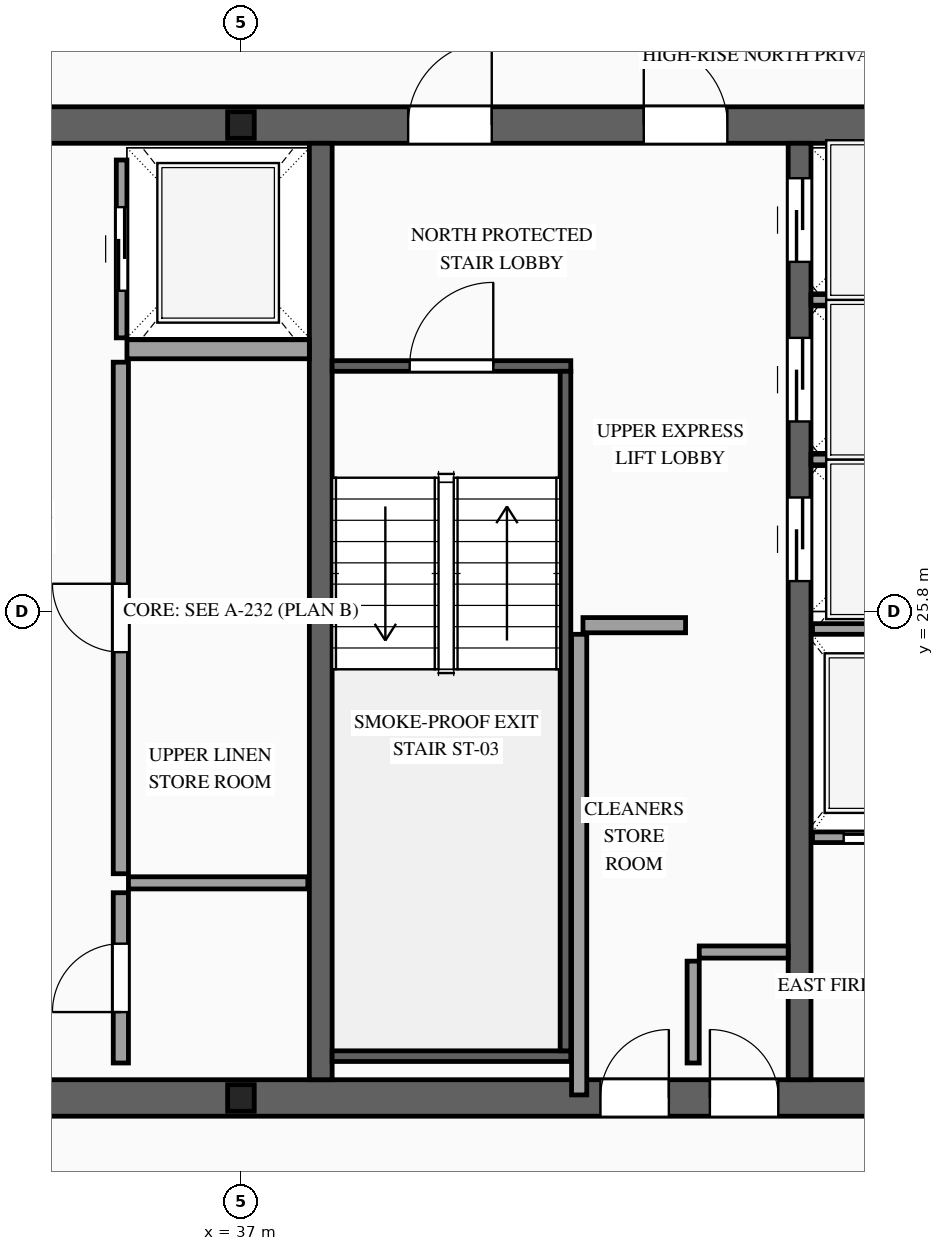
"""IFC4 building model, lengths in metres.
Left out: names, types, materials, properties, quantities, classifications, styles, units other than length and angle.
Written with IfcOpenShell. Run it as: python <this file> out.ifc"""

import sys

from ifc_helpers import new_model, si_unit, direction, frame, frame_2d, origin, origin_2d, place, context, subcontext, project, spatial, rectangle, i_section, extrude, source, transform, mapped, element, fill, save


model = new_model("IFC4")
c1 = context("Model", 3, precision=1e-05, world=origin(), true_north=direction((0.0, 1.0)))
c2 = subcontext(c1, "Body", "Model", "MODEL_VIEW")
j1 = project(units=[si_unit("LENGTHUNIT", "METRE"), si_unit("PLANEANGLEUNIT", "RADIAN")], contexts=[c1])
p1 = place(None, origin())
s1 = spatial("IfcSite", under=j1, at=p1, CompositionType="ELEMENT")
p2 = place(p1, origin())
s2 = spatial("IfcBuilding", under=s1, at=p2, CompositionType="ELEMENT")
p3 = place(p2, frame((0.0, 0.0, 299.6)))
s3 = spatial("IfcBuildingStorey", under=s2, at=p3, CompositionType="ELEMENT", Elevation=299.6)
p4 = place(p3, frame((23.56, 19.4, 0.0), z_axis=(0.0, 0.0, 1.0), x_axis=(1.0, 0.0, 0.0)))
e1 = element("IfcWall", 1, at=p4, inside=s3, PredefinedType="SHEAR", context=c2, shape_type="SweptSolid", body=[
    extrude(rectangle(XDim=26.88, YDim=0.48, at=frame_2d((13.44, 0.0))), origin(), (0.0, 0.0, 1.0), 3.5),
])
p5 = place(p4, frame((1.89, 0.0, 0.0)))
e2 = element("IfcOpeningElement", 2, at=p5, cuts=e1, PredefinedType="OPENING", context=c2, shape_type="SweptSolid", body=[
    extrude(rectangle(XDim=1.1, YDim=2.2, at=frame_2d((0.55, 1.1))), frame((0.0, 0.255, 0.0), z_axis=(0.0, -1.0, 0.0), x_axis=(1.0, 0.0, 0.0)), (0.0, 0.0, 1.0), 0.51),
])
p6 = place(p4, frame((9.79, 0.0, 0.0)))
e3 = element("IfcOpeningElement", 3, at=p6, cuts=e1, PredefinedType="OPENING", context=c2, shape_type="SweptSolid", body=[
    extrude(rectangle(XDim=1.1, YDim=2.2, at=frame_2d((0.55, 1.1))), frame((0.0, 0.255, 0.0), z_axis=(0.0, -1.0, 0.0), x_axis=(1.0, 0.0, 0.0)), (0.0, 0.0, 1.0), 0.51),
])
p7 = place(p4, frame((22.99, 0.0, 0.0)))
e4 = element("IfcOpeningElement", 4, at=p7, cuts=e1, PredefinedType="OPENING", context=c2, shape_type="SweptSolid", body=[
    extrude(rectangle(XDim=1.1, YDim=2.2, at=frame_2d((0.55, 1.1))), frame((0.0, 0.255, 0.0), z_axis=(0.0, -1.0, 0.0), x_axis=(1.0, 0.0, 0.0)), (0.0, 0.0, 1.0), 0.51),
])
p8 = place(p4, frame((19.61, 0.0, 0.0)))
e5 = element("IfcOpeningElement", 5, at=p8, cuts=e1, PredefinedType="OPENING", context=c2, shape_type="SweptSolid", body=[
    extrude(rectangle(XDim=0.9, YDim=2.15, at=frame_2d((0.45, 1.075))), frame((0.0, 0.255, 0.0), z_axis=(0.0, -1.0, 0.0), x_axis=(1.0, 0.0, 0.0)), (0.0, 0.0, 1.0), 0.51),
])
p9 = place(p4, frame((18.17, 0.0, 0.0)))
e6 = element("IfcOpeningElement", 6, at=p9, cuts=e1, PredefinedType="OPENING", context=c2, shape_type="SweptSolid", body=[
    extrude(rectangle(XDim=0.9, YDim=2.15, at=frame_2d((0.45, 1.075))), frame((0.0, 0.255, 0.0), z_axis=(0.0, -1.0, 0.0), x_axis=(1.0, 0.0, 0.0)), (0.0, 0.0, 1.0), 0.51),
])
p10 = place(p3, frame((23.56, 32.2, 0.0), z_axis=(0.0, 0.0, 1.0), x_axis=(1.0, 0.0, 0.0)))
e7 = element("IfcWall", 7, at=p10, inside=s3, PredefinedType="SHEAR", context=c2, shape_type="SweptSolid", body=[
    extrude(rectangle(XDim=26.88, YDim=0.48, at=frame_2d((13.44, 0.0))), origin(), (0.0, 0.0, 1.0), 3.5),
])
p11 = place(p10, frame((4.51, 0.0, 0.0)))
e8 = element("IfcOpeningElement", 8, at=p11, cuts=e7, PredefinedType="OPENING", context=c2, shape_type="SweptSolid", body=[
    extrude(rectangle(XDim=0.9, YDim=2.15, at=frame_2d((0.45, 1.075))), frame((0.0, 0.255, 0.0), z_axis=(0.0, -1.0, 0.0), x_axis=(1.0, 0.0, 0.0)), (0.0, 0.0, 1.0), 0.51),
])
p12 = place(p10, frame((9.79, 0.0, 0.0)))
e9 = element("IfcOpeningElement", 9, at=p12, cuts=e7, PredefinedType="OPENING", context=c2, shape_type="SweptSolid", body=[
    extrude(rectangle(XDim=1.1, YDim=2.2, at=frame_2d((0.55, 1.1))), frame((0.0, 0.255, 0.0), z_axis=(0.0, -1.0, 0.0), x_axis=(1.0, 0.0, 0.0)), (0.0, 0.0, 1.0), 0.51),
])
p13 = place(p10, frame((15.64, 0.0, 0.0)))
e10 = element("IfcOpeningElement", 10, at=p13, cuts=e7, PredefinedType="OPENING", context=c2, shape_type="SweptSolid", body=[
    extrude(rectangle(XDim=1.1, YDim=2.2, at=frame_2d((0.55, 1.1))), frame((0.0, 0.255, 0.0), z_axis=(0.0, -1.0, 0.0), x_axis=(1.0, 0.0, 0.0)), (0.0, 0.0, 1.0), 0.51),
])
p14 = place(p10, frame((18.74, 0.0, 0.0)))
e11 = element("IfcOpeningElement", 11, at=p14, cuts=e7, PredefinedType="OPENING", context=c2, shape_type="SweptSolid", body=[
    extrude(rectangle(XDim=1.1, YDim=2.2, at=frame_2d((0.55, 1.1))), frame((0.0, 0.255, 0.0), z_axis=(0.0, -1.0, 0.0), x_axis=(1.0, 0.0, 0.0)), (0.0, 0.0, 1.0), 0.51),
])
m1 = source(origin(), c2, "Body", "SweptSolid", [
    extrude(rectangle(XDim=12.32, YDim=0.3, at=frame_2d((6.16, 0.0))), origin(), (0.0, 0.0, 1.0), 3.5),
])
p15 = place(p3, frame((38.05, 19.64, 0.0), z_axis=(0.0, 0.0, 1.0), x_axis=(0.0, 1.0, 0.0)))
e12 = element("IfcWall", 12, at=p15, inside=s3, PredefinedType="SOLIDWALL", context=c2, shape_type="MappedRepresentation", body=[
    mapped(m1, transform((0.0, 0.0, 0.0), scale=1.0)),
])
p16 = place(p3, frame((44.35, 19.64, 0.0), z_axis=(0.0, 0.0, 1.0), x_axis=(0.0, 1.0, 0.0)))
e13 = element("IfcWall", 13, at=p16, inside=s3, PredefinedType="SOLIDWALL", context=c2, shape_type="SweptSolid", body=[
    extrude(rectangle(XDim=12.32, YDim=0.3, at=frame_2d((6.16, 0.0))), origin(), (0.0, 0.0, 1.0), 3.5),
])
p17 = place(p16, frame((6.56, 0.0, 0.0)))
e14 = element("IfcOpeningElement", 14, at=p17, cuts=e13, PredefinedType="OPENING", context=c2, shape_type="SweptSolid", body=[
    extrude(rectangle(XDim=1.1, YDim=2.2, at=frame_2d((0.55, 1.1))), frame((0.0, 0.165, 0.0), z_axis=(0.0, -1.0, 0.0), x_axis=(1.0, 0.0, 0.0)), (0.0, 0.0, 1.0), 0.33),
])
p18 = place(p16, frame((8.66, 0.0, 0.0)))
e15 = element("IfcOpeningElement", 15, at=p18, cuts=e13, PredefinedType="OPENING", context=c2, shape_type="SweptSolid", body=[
    extrude(rectangle(XDim=1.1, YDim=2.2, at=frame_2d((0.55, 1.1))), frame((0.0, 0.165, 0.0), z_axis=(0.0, -1.0, 0.0), x_axis=(1.0, 0.0, 0.0)), (0.0, 0.0, 1.0), 0.33),
])
p19 = place(p16, frame((10.76, 0.0, 0.0)))
e16 = element("IfcOpeningElement", 16, at=p19, cuts=e13, PredefinedType="OPENING", context=c2, shape_type="SweptSolid", body=[
    extrude(rectangle(XDim=1.1, YDim=2.2, at=frame_2d((0.55, 1.1))), frame((0.0, 0.165, 0.0), z_axis=(0.0, -1.0, 0.0), x_axis=(1.0, 0.0, 0.0)), (0.0, 0.0, 1.0), 0.33),
])
m2 = source(origin(), c2, "Body", "SweptSolid", [
    extrude(i_section(OverallWidth=0.35, OverallDepth=0.35, WebThickness=0.012, FlangeThickness=0.019, at=origin_2d()), origin(), (0.0, 0.0, 1.0), 3.5),
])
for number, where, z_axis, x_axis in (
    (17, (37.0, 19.4, 0.0), (0.0, 0.0, 1.0), (1.0, 0.0, 0.0)),
    (18, (37.0, 32.2, 0.0), (0.0, 0.0, 1.0), (1.0, 0.0, 0.0)),
):
    element("IfcColumn", number, at=place(p3, frame(where, z_axis=z_axis, x_axis=x_axis)), inside=s3, PredefinedType="COLUMN", context=c2, shape_type="MappedRepresentation", body=[
        mapped(m2, transform((0.0, 0.0, 0.0), scale=1.0)),
    ])
p20 = place(p3, frame((44.52, 22.83, 0.0), z_axis=(0.0, 0.0, 1.0), x_axis=(1.0, 0.0, 0.0)))
e19 = element("IfcWall", 19, at=p20, inside=s3, PredefinedType="SOLIDWALL", context=c2, shape_type="SweptSolid", body=[
    extrude(rectangle(XDim=1.92, YDim=0.14, at=frame_2d((0.96, 0.0))), origin(), (0.0, 0.0, 1.0), 3.28),
])
p21 = place(p20, frame((0.41, 0.0, 0.0)))
e20 = element("IfcOpeningElement", 20, at=p21, cuts=e19, PredefinedType="OPENING", context=c2, shape_type="SweptSolid", body=[
    extrude(rectangle(XDim=1.1, YDim=2.2, at=frame_2d((0.55, 1.1))), frame((0.0, 0.085, 0.0), z_axis=(0.0, -1.0, 0.0), x_axis=(1.0, 0.0, 0.0)), (0.0, 0.0, 1.0), 0.17),
])
m3 = source(origin(), c2, "Body", "SweptSolid", [
    extrude(rectangle(XDim=1.92, YDim=0.14, at=frame_2d((0.96, 0.0))), origin(), (0.0, 0.0, 1.0), 3.28),
])
p22 = place(p3, frame((44.52, 25.57, 0.0), z_axis=(0.0, 0.0, 1.0), x_axis=(1.0, 0.0, 0.0)))
e21 = element("IfcWall", 21, at=p22, inside=s3, PredefinedType="SOLIDWALL", context=c2, shape_type="MappedRepresentation", body=[
    mapped(m3, transform((0.0, 0.0, 0.0), scale=1.0)),
])
p23 = place(p3, frame((35.43, 29.4, 0.0), z_axis=(0.0, 0.0, 1.0), x_axis=(0.0, 1.0, 0.0)))
e22 = element("IfcWall", 22, at=p23, inside=s3, PredefinedType="SOLIDWALL", context=c2, shape_type="SweptSolid", body=[
    extrude(rectangle(XDim=2.34, YDim=0.14, at=frame_2d((1.17, 0.0))), origin(), (0.0, 0.0, 1.0), 3.28),
])
p24 = place(p23, frame((0.62, 0.0, 0.0)))
e23 = element("IfcOpeningElement", 23, at=p24, cuts=e22, PredefinedType="OPENING", context=c2, shape_type="SweptSolid", body=[
    extrude(rectangle(XDim=1.1, YDim=2.2, at=frame_2d((0.55, 1.1))), frame((0.0, 0.085, 0.0), z_axis=(0.0, -1.0, 0.0), x_axis=(1.0, 0.0, 0.0)), (0.0, 0.0, 1.0), 0.17),
])
m4 = source(origin(), c2, "Body", "SweptSolid", [
    extrude(rectangle(XDim=2.4, YDim=0.25, at=frame_2d((1.2, 0.0))), origin(), (0.0, 0.0, 1.0), 3.28),
])
p25 = place(p3, frame((35.5, 29.25, 0.0), z_axis=(0.0, 0.0, 1.0), x_axis=(1.0, 0.0, 0.0)))
e24 = element("IfcWall", 24, at=p25, inside=s3, PredefinedType="SOLIDWALL", context=c2, shape_type="MappedRepresentation", body=[
    mapped(m4, transform((0.0, 0.0, 0.0), scale=1.0)),
])
m5 = source(origin(), c2, "Body", "SweptSolid", [
    extrude(rectangle(XDim=2.0, YDim=0.14, at=frame_2d((1.0, 0.0))), origin(), (0.0, 0.0, 1.0), 3.28),
])
for number, where, z_axis, x_axis in (
    (25, (44.5, 27.8, 0.0), (0.0, 0.0, 1.0), (1.0, 0.0, 0.0)),
    (26, (44.5, 29.9, 0.0), (0.0, 0.0, 1.0), (1.0, 0.0, 0.0)),
):
    element("IfcWall", number, at=place(p3, frame(where, z_axis=z_axis, x_axis=x_axis)), inside=s3, PredefinedType="SOLIDWALL", context=c2, shape_type="MappedRepresentation", body=[
        mapped(m5, transform((0.0, 0.0, 0.0), scale=1.0)),
    ])
p26 = place(p3, frame((38.2, 29.03, 0.0), z_axis=(0.0, 0.0, 1.0), x_axis=(1.0, 0.0, 0.0)))
e27 = element("IfcWall", 27, at=p26, inside=s3, PredefinedType="SOLIDWALL", context=c2, shape_type="SweptSolid", body=[
    extrude(rectangle(XDim=3.14, YDim=0.14, at=frame_2d((1.57, 0.0))), origin(), (0.0, 0.0, 1.0), 3.28),
])
p27 = place(p26, frame((1.02, 0.0, 0.0)))
e28 = element("IfcOpeningElement", 28, at=p27, cuts=e27, PredefinedType="OPENING", context=c2, shape_type="SweptSolid", body=[
    extrude(rectangle(XDim=1.1, YDim=2.2, at=frame_2d((0.55, 1.1))), frame((0.0, 0.085, 0.0), z_axis=(0.0, -1.0, 0.0), x_axis=(1.0, 0.0, 0.0)), (0.0, 0.0, 1.0), 0.17),
])
m6 = source(origin(), c2, "Body", "SweptSolid", [
    extrude(rectangle(XDim=3.14, YDim=0.14, at=frame_2d((1.57, 0.0))), origin(), (0.0, 0.0, 1.0), 3.28),
])
p28 = place(p3, frame((38.2, 19.95, 0.0), z_axis=(0.0, 0.0, 1.0), x_axis=(1.0, 0.0, 0.0)))
e29 = element("IfcWall", 29, at=p28, inside=s3, PredefinedType="SOLIDWALL", context=c2, shape_type="MappedRepresentation", body=[
    mapped(m6, transform((0.0, 0.0, 0.0), scale=1.0)),
])
m7 = source(origin(), c2, "Body", "SweptSolid", [
    extrude(rectangle(XDim=8.94, YDim=0.14, at=frame_2d((4.47, 0.0))), origin(), (0.0, 0.0, 1.0), 3.28),
])
p29 = place(p3, frame((41.27, 20.02, 0.0), z_axis=(0.0, 0.0, 1.0), x_axis=(0.0, 1.0, 0.0)))
e30 = element("IfcWall", 30, at=p29, inside=s3, PredefinedType="SOLIDWALL", context=c2, shape_type="MappedRepresentation", body=[
    mapped(m7, transform((0.0, 0.0, 0.0), scale=1.0)),
])
p30 = place(p3, frame((35.42, 19.86, 0.0), z_axis=(0.0, 0.0, 1.0), x_axis=(0.0, 1.0, 0.0)))
e31 = element("IfcWall", 31, at=p30, inside=s3, PredefinedType="PARTITIONING", context=c2, shape_type="SweptSolid", body=[
    extrude(rectangle(XDim=2.24, YDim=0.2, at=frame_2d((1.12, 0.0))), origin(), (0.0, 0.0, 1.0), 3.28),
])
p31 = place(p30, frame((0.67, 0.0, 0.0)))
e32 = element("IfcOpeningElement", 32, at=p31, cuts=e31, PredefinedType="OPENING", context=c2, shape_type="SweptSolid", body=[
    extrude(rectangle(XDim=0.9, YDim=2.15, at=frame_2d((0.45, 1.075))), frame((0.0, 0.115, 0.0), z_axis=(0.0, -1.0, 0.0), x_axis=(1.0, 0.0, 0.0)), (0.0, 0.0, 1.0), 0.23),
])
p32 = place(p3, frame((35.42, 22.35, 0.0), z_axis=(0.0, 0.0, 1.0), x_axis=(0.0, 1.0, 0.0)))
e33 = element("IfcWall", 33, at=p32, inside=s3, PredefinedType="PARTITIONING", context=c2, shape_type="SweptSolid", body=[
    extrude(rectangle(XDim=6.73, YDim=0.2, at=frame_2d((3.365, 0.0))), origin(), (0.0, 0.0, 1.0), 3.28),
])
p33 = place(p32, frame((2.915, 0.0, 0.0)))
e34 = element("IfcOpeningElement", 34, at=p33, cuts=e33, PredefinedType="OPENING", context=c2, shape_type="SweptSolid", body=[
    extrude(rectangle(XDim=0.9, YDim=2.15, at=frame_2d((0.45, 1.075))), frame((0.0, 0.115, 0.0), z_axis=(0.0, -1.0, 0.0), x_axis=(1.0, 0.0, 0.0)), (0.0, 0.0, 1.0), 0.23),
])
m8 = source(origin(), c2, "Body", "SweptSolid", [
    extrude(rectangle(XDim=2.36, YDim=0.16, at=frame_2d((1.18, 0.0))), origin(), (0.0, 0.0, 1.0), 3.28),
])
p34 = place(p3, frame((35.52, 22.23, 0.0), z_axis=(0.0, 0.0, 1.0), x_axis=(1.0, 0.0, 0.0)))
e35 = element("IfcWall", 35, at=p34, inside=s3, PredefinedType="PARTITIONING", context=c2, shape_type="MappedRepresentation", body=[
    mapped(m8, transform((0.0, 0.0, 0.0), scale=1.0)),
])
m9 = source(origin(), c2, "Body", "SweptSolid", [
    extrude(rectangle(XDim=1.34, YDim=0.16, at=frame_2d((0.67, 0.0))), origin(), (0.0, 0.0, 1.0), 3.28),
])
p35 = place(p3, frame((42.95, 19.86, 0.0), z_axis=(0.0, 0.0, 1.0), x_axis=(0.0, 1.0, 0.0)))
e36 = element("IfcWall", 36, at=p35, inside=s3, PredefinedType="PARTITIONING", context=c2, shape_type="MappedRepresentation", body=[
    mapped(m9, transform((0.0, 0.0, 0.0), scale=1.0)),
])
m10 = source(origin(), c2, "Body", "SweptSolid", [
    extrude(rectangle(XDim=1.17, YDim=0.16, at=frame_2d((0.585, 0.0))), origin(), (0.0, 0.0, 1.0), 3.28),
])
p36 = place(p3, frame((43.03, 21.32, 0.0), z_axis=(0.0, 0.0, 1.0), x_axis=(1.0, 0.0, 0.0)))
e37 = element("IfcWall", 37, at=p36, inside=s3, PredefinedType="PARTITIONING", context=c2, shape_type="MappedRepresentation", body=[
    mapped(m10, transform((0.0, 0.0, 0.0), scale=1.0)),
])
m11 = source(origin(), c2, "Body", "SweptSolid", [
    extrude(rectangle(XDim=6.06, YDim=0.2, at=frame_2d((3.03, 0.0))), origin(), (0.0, 0.0, 1.0), 3.28),
])
p37 = place(p3, frame((41.45, 19.44, 0.0), z_axis=(0.0, 0.0, 1.0), x_axis=(0.0, 1.0, 0.0)))
e38 = element("IfcWall", 38, at=p37, inside=s3, PredefinedType="PARTITIONING", context=c2, shape_type="MappedRepresentation", body=[
    mapped(m11, transform((0.0, 0.0, 0.0), scale=1.0)),
])
m12 = source(origin(), c2, "Body", "SweptSolid", [
    extrude(rectangle(XDim=1.35, YDim=0.2, at=frame_2d((0.675, 0.0))), origin(), (0.0, 0.0, 1.0), 3.28),
])
p38 = place(p3, frame((41.5, 25.62, 0.0), z_axis=(0.0, 0.0, 1.0), x_axis=(1.0, 0.0, 0.0)))
e39 = element("IfcWall", 39, at=p38, inside=s3, PredefinedType="PARTITIONING", context=c2, shape_type="MappedRepresentation", body=[
    mapped(m12, transform((0.0, 0.0, 0.0), scale=1.0)),
])
m13 = source(origin(), c2, "Body", "SweptSolid", [
    extrude(rectangle(XDim=1.1, YDim=2.2, at=frame_2d((0.55, 1.1))), frame((0.0, 0.025, 0.0), z_axis=(0.0, -1.0, 0.0), x_axis=(1.0, 0.0, 0.0)), (0.0, 0.0, 1.0), 0.05),
])
p39 = place(p21, origin())
e40 = element("IfcDoor", 40, at=p39, inside=s3, OperationType="SLIDING_TO_RIGHT", PredefinedType="DOOR", context=c2, shape_type="MappedRepresentation", body=[
    mapped(m13, transform((0.0, 0.0, 0.0), scale=1.0)),
])
fill(e20, e40)
p40 = place(p24, origin())
e41 = element("IfcDoor", 41, at=p40, inside=s3, OperationType="SLIDING_TO_RIGHT", PredefinedType="DOOR", context=c2, shape_type="MappedRepresentation", body=[
    mapped(m13, transform((0.0, 0.0, 0.0), scale=1.0)),
])
fill(e23, e41)
p41 = place(p17, origin())
e42 = element("IfcDoor", 42, at=p41, inside=s3, OperationType="SLIDING_TO_LEFT", PredefinedType="DOOR", context=c2, shape_type="MappedRepresentation", body=[
    mapped(m13, transform((0.0, 0.0, 0.0), scale=1.0)),
])
fill(e14, e42)
p42 = place(p18, origin())
e43 = element("IfcDoor", 43, at=p42, inside=s3, OperationType="SLIDING_TO_RIGHT", PredefinedType="DOOR", context=c2, shape_type="MappedRepresentation", body=[
    mapped(m13, transform((0.0, 0.0, 0.0), scale=1.0)),
])
fill(e15, e43)
p43 = place(p19, origin())
e44 = element("IfcDoor", 44, at=p43, inside=s3, OperationType="SLIDING_TO_LEFT", PredefinedType="DOOR", context=c2, shape_type="MappedRepresentation", body=[
    mapped(m13, transform((0.0, 0.0, 0.0), scale=1.0)),
])
fill(e16, e44)
m14 = source(origin(), c2, "Body", "SweptSolid", [
    extrude(rectangle(XDim=1.1, YDim=2.2, at=frame_2d((0.55, 1.1))), frame((0.0, 0.025, 0.0), z_axis=(0.0, -1.0, 0.0), x_axis=(1.0, 0.0, 0.0)), (0.0, 0.0, 1.0), 0.05),
])
p44 = place(p27, origin())
e45 = element("IfcDoor", 45, at=p44, inside=s3, OperationType="SINGLE_SWING_RIGHT", PredefinedType="DOOR", context=c2, shape_type="MappedRepresentation", body=[
    mapped(m14, transform((0.0, 0.0, 0.0), scale=1.0)),
])
fill(e28, e45)
p45 = place(p13, origin())
e46 = element("IfcDoor", 46, at=p45, inside=s3, OperationType="SINGLE_SWING_RIGHT", PredefinedType="DOOR", context=c2, shape_type="MappedRepresentation", body=[
    mapped(m14, transform((0.0, 0.0, 0.0), scale=1.0)),
])
fill(e10, e46)
p46 = place(p14, origin())
e47 = element("IfcDoor", 47, at=p46, inside=s3, OperationType="SINGLE_SWING_LEFT", PredefinedType="DOOR", context=c2, shape_type="MappedRepresentation", body=[
    mapped(m14, transform((0.0, 0.0, 0.0), scale=1.0)),
])
fill(e11, e47)
m15 = source(origin(), c2, "Body", "SweptSolid", [
    extrude(rectangle(XDim=0.9, YDim=2.15, at=frame_2d((0.45, 1.075))), frame((0.0, 0.025, 0.0), z_axis=(0.0, -1.0, 0.0), x_axis=(1.0, 0.0, 0.0)), (0.0, 0.0, 1.0), 0.05),
])
p47 = place(p31, origin())
e48 = element("IfcDoor", 48, at=p47, inside=s3, OperationType="SINGLE_SWING_LEFT", PredefinedType="DOOR", context=c2, shape_type="MappedRepresentation", body=[
    mapped(m15, transform((0.0, 0.0, 0.0), scale=1.0)),
])
fill(e32, e48)
p48 = place(p33, origin())
e49 = element("IfcDoor", 49, at=p48, inside=s3, OperationType="SINGLE_SWING_RIGHT", PredefinedType="DOOR", context=c2, shape_type="MappedRepresentation", body=[
    mapped(m15, transform((0.0, 0.0, 0.0), scale=1.0)),
])
fill(e34, e49)
p49 = place(p8, origin())
e50 = element("IfcDoor", 50, at=p49, inside=s3, OperationType="SINGLE_SWING_LEFT", PredefinedType="DOOR", context=c2, shape_type="MappedRepresentation", body=[
    mapped(m15, transform((0.0, 0.0, 0.0), scale=1.0)),
])
fill(e5, e50)
p50 = place(p9, origin())
e51 = element("IfcDoor", 51, at=p50, inside=s3, OperationType="SINGLE_SWING_RIGHT", PredefinedType="DOOR", context=c2, shape_type="MappedRepresentation", body=[
    mapped(m15, transform((0.0, 0.0, 0.0), scale=1.0)),
])
fill(e6, e51)
save(model, sys.argv[1])
